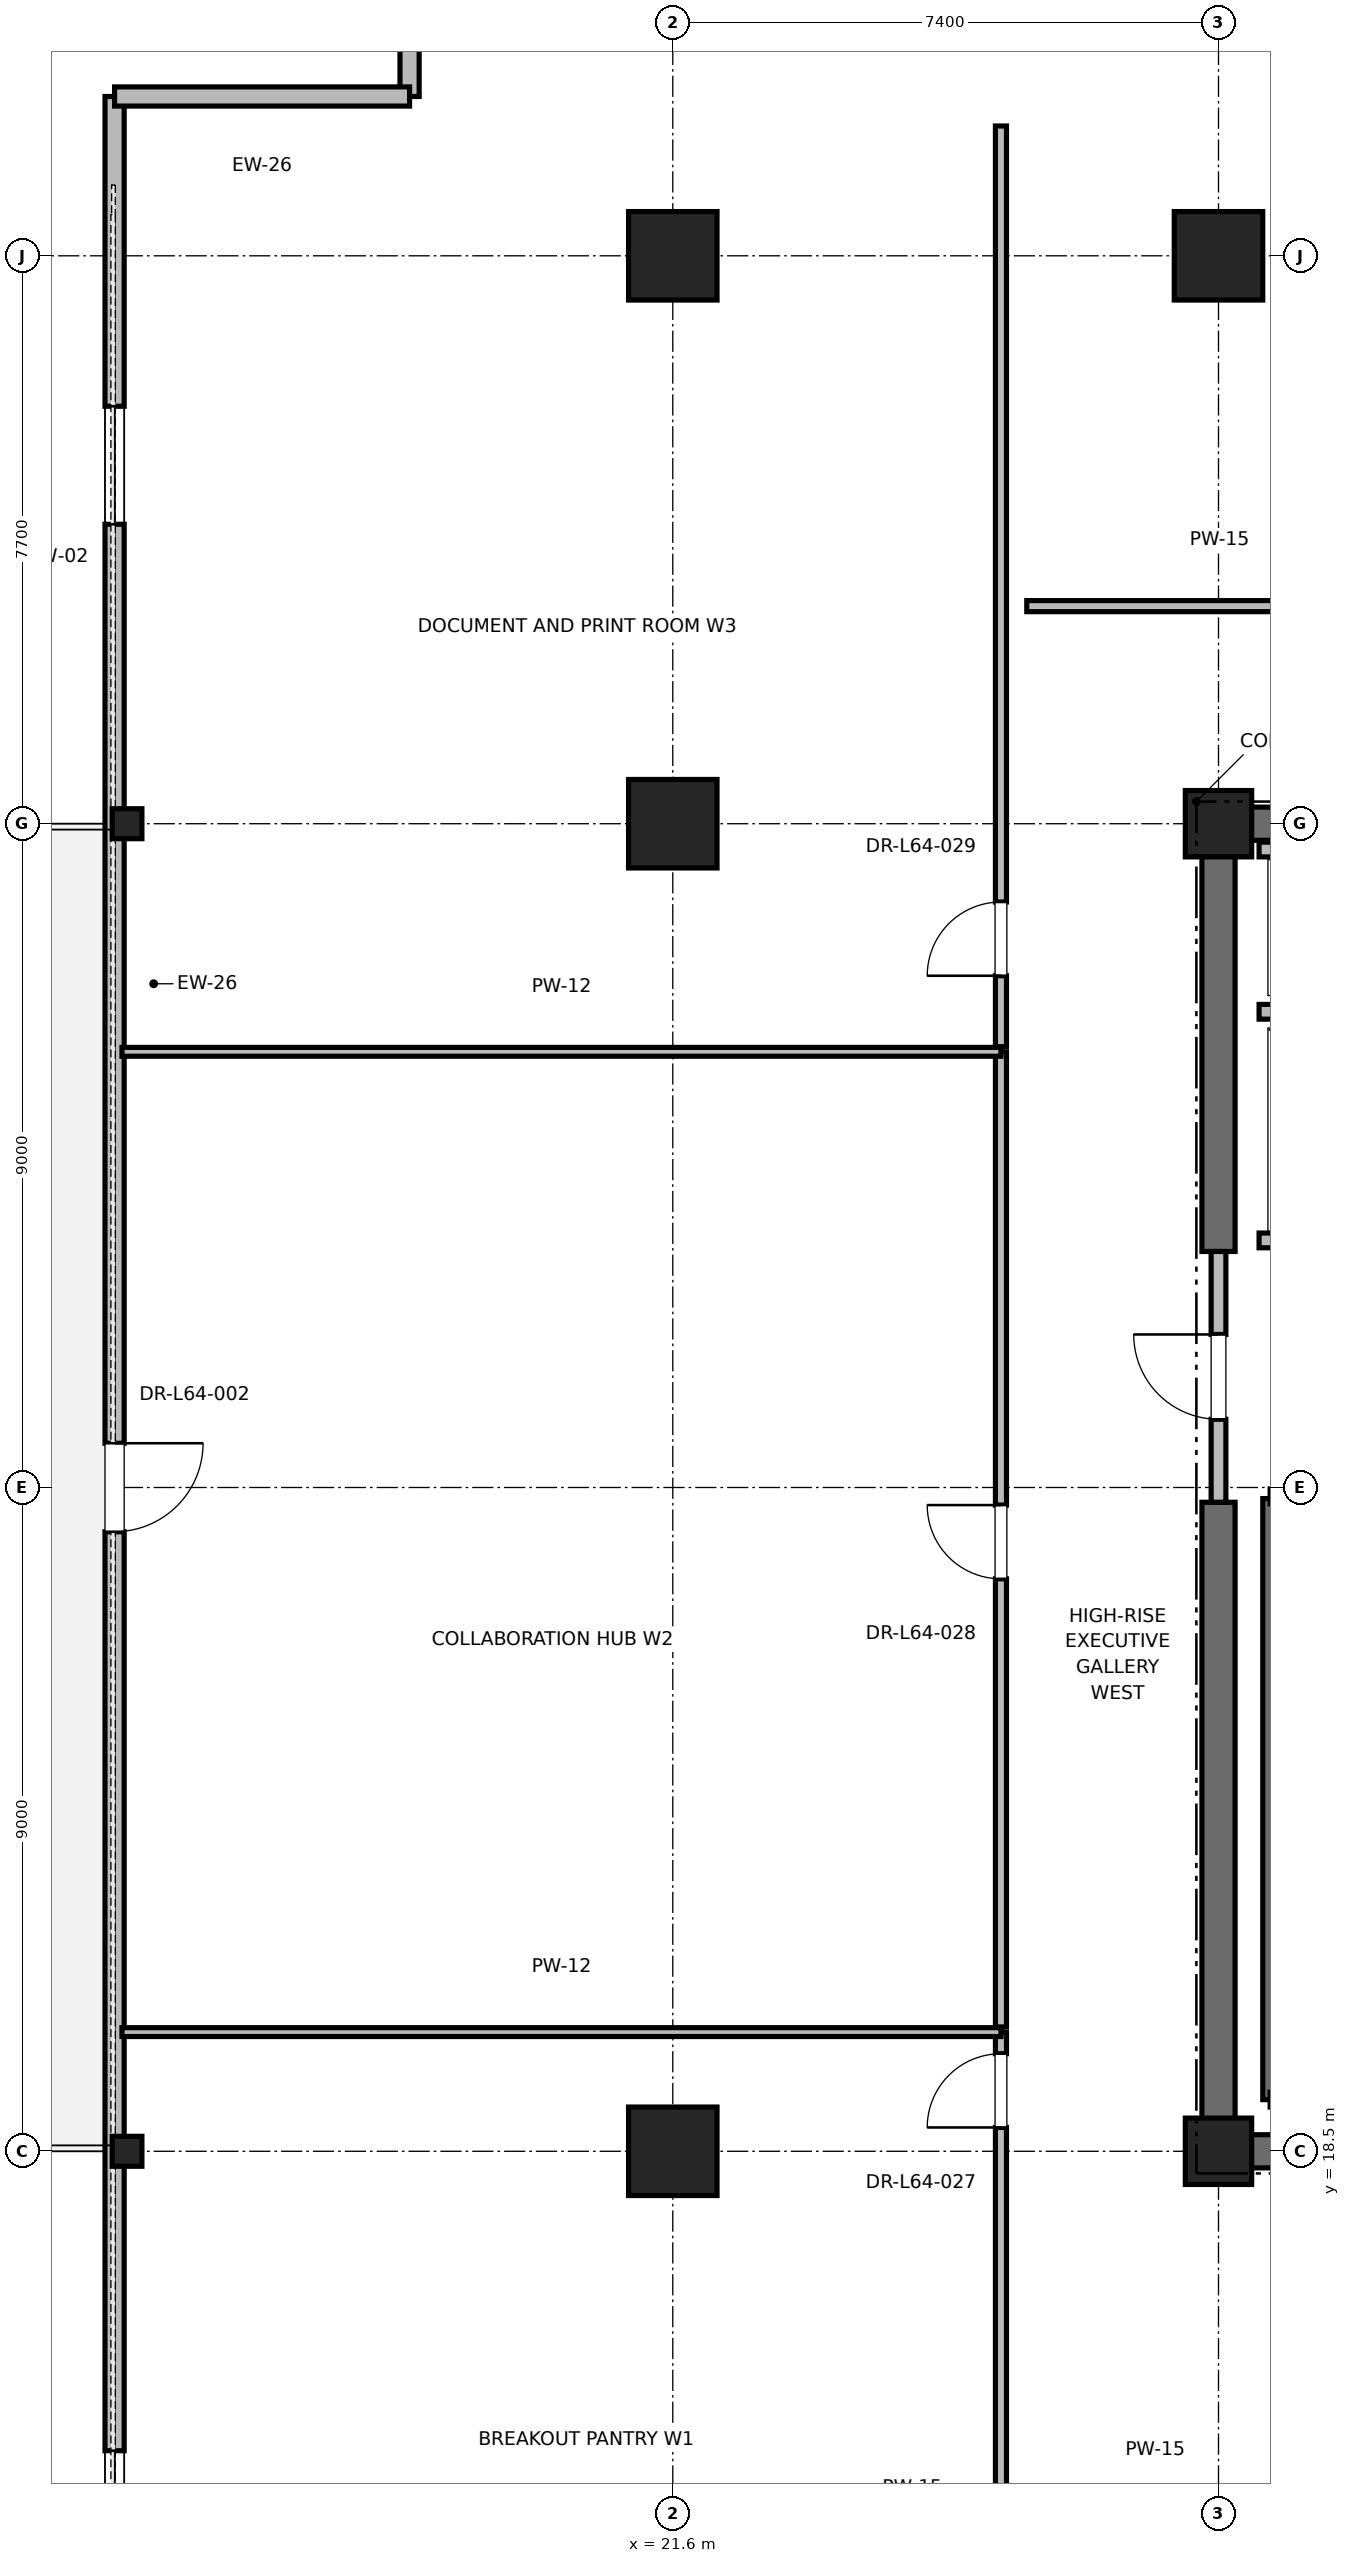
"""IFC4 building model, lengths in metres.
Left out: names, types, materials, properties, quantities, classifications, styles, units other than length and angle.
Written with IfcOpenShell. Run it as: python <this file> out.ifc"""

import sys

from ifc_helpers import new_model, si_unit, direction, frame, frame_2d, origin, origin_2d, place, context, subcontext, project, spatial, rectangle, i_section, extrude, element, fill, save


model = new_model("IFC4")
c1 = context("Model", 3, precision=1e-05, world=origin(), true_north=direction((0.0, 1.0)))
c2 = subcontext(c1, "Body", "Model", "MODEL_VIEW")
j1 = project(units=[si_unit("LENGTHUNIT", "METRE"), si_unit("PLANEANGLEUNIT", "RADIAN")], contexts=[c1])
p1 = place(None, origin())
s1 = spatial("IfcSite", under=j1, at=p1, CompositionType="ELEMENT")
p2 = place(p1, origin())
s2 = spatial("IfcBuilding", under=s1, at=p2, CompositionType="ELEMENT")
p3 = place(p2, frame((0.0, 0.0, 275.2)))
s3 = spatial("IfcBuildingStorey", under=s2, at=p3, CompositionType="ELEMENT", Elevation=275.2)
for number, where, z_axis, x_axis in (
    (1, (29.0, 44.2, 0.0), (0.0, 0.0, 1.0), (1.0, 0.0, 0.0)),
    (2, (21.6, 18.5, 0.0), (0.0, 0.0, 1.0), (1.0, 0.0, 0.0)),
    (3, (21.6, 36.5, 0.0), (0.0, 0.0, 1.0), (1.0, 0.0, 0.0)),
    (4, (21.6, 44.2, 0.0), (0.0, 0.0, 1.0), (1.0, 0.0, 0.0)),
):
    element("IfcColumn", number, at=place(p3, frame(where, z_axis=z_axis, x_axis=x_axis)), inside=s3, PredefinedType="COLUMN", context=c2, shape_type="SweptSolid", body=[
        extrude(rectangle(XDim=1.2, YDim=1.2, at=origin_2d()), origin(), (0.0, 0.0, 1.0), 4.0),
    ])
for number, where, z_axis, x_axis in (
    (5, (14.2, 18.5, 0.0), (0.0, 0.0, 1.0), (1.0, 0.0, 0.0)),
    (6, (14.2, 36.5, 0.0), (0.0, 0.0, 1.0), (1.0, 0.0, 0.0)),
):
    element("IfcColumn", number, at=place(p3, frame(where, z_axis=z_axis, x_axis=x_axis)), inside=s3, PredefinedType="COLUMN", context=c2, shape_type="SweptSolid", body=[
        extrude(i_section(OverallWidth=0.403, OverallDepth=0.406, WebThickness=0.027, FlangeThickness=0.043, FilletRadius=0.015, at=origin_2d()), origin(), (0.0, 0.0, 1.0), 4.0),
    ])
for number, where, z_axis, x_axis in (
    (7, (29.0, 18.5, 0.0), (0.0, 0.0, 1.0), (1.0, 0.0, 0.0)),
    (8, (29.0, 36.5, 0.0), (0.0, 0.0, 1.0), (1.0, 0.0, 0.0)),
):
    element("IfcColumn", number, at=place(p3, frame(where, z_axis=z_axis, x_axis=x_axis)), inside=s3, PredefinedType="PILASTER", context=c2, shape_type="SweptSolid", body=[
        extrude(rectangle(XDim=0.9, YDim=0.9, at=origin_2d()), origin(), (0.0, 0.0, 1.0), 4.0),
    ])
p4 = place(p3, frame((29.0, 18.5, 0.0), z_axis=(0.0, 0.0, 1.0), x_axis=(1.0, 0.0, 0.0)))
e9 = element("IfcWall", 9, at=p4, inside=s3, PredefinedType="SHEAR", context=c2, shape_type="SweptSolid", body=[
    extrude(rectangle(XDim=9.2, YDim=0.45, at=frame_2d((4.6, 0.0))), origin(), (0.0, 0.0, 1.0), 3.785),
])
p5 = place(p3, frame((29.0, 36.5, 0.0), z_axis=(0.0, 0.0, 1.0), x_axis=(1.0, 0.0, 0.0)))
e10 = element("IfcWall", 10, at=p5, inside=s3, PredefinedType="SHEAR", context=c2, shape_type="SweptSolid", body=[
    extrude(rectangle(XDim=5.8, YDim=0.45, at=frame_2d((2.9, 0.0))), origin(), (0.0, 0.0, 1.0), 3.785),
])
p6 = place(p3, frame((29.0, 18.5, 0.0), z_axis=(0.0, 0.0, 1.0), x_axis=(0.0, 1.0, 0.0)))
e11 = element("IfcWall", 11, at=p6, inside=s3, PredefinedType="SHEAR", context=c2, shape_type="SweptSolid", body=[
    extrude(rectangle(XDim=8.8, YDim=0.45, at=frame_2d((4.4, 0.0))), origin(), (0.0, 0.0, 1.0), 3.785),
])
p7 = place(p3, frame((29.0, 30.7, 0.0), z_axis=(0.0, 0.0, 1.0), x_axis=(0.0, 1.0, 0.0)))
e12 = element("IfcWall", 12, at=p7, inside=s3, PredefinedType="SHEAR", context=c2, shape_type="SweptSolid", body=[
    extrude(rectangle(XDim=5.8, YDim=0.45, at=frame_2d((2.9, 0.0))), origin(), (0.0, 0.0, 1.0), 3.785),
])
p8 = place(p3, frame((14.031, 46.36, 0.0), z_axis=(0.0, 0.0, 1.0), x_axis=(0.0, -1.0, 0.0)))
e13 = element("IfcWall", 13, at=p8, inside=s3, PredefinedType="PARAPET", context=c2, shape_type="SweptSolid", body=[
    extrude(rectangle(XDim=37.72, YDim=0.26, at=frame_2d((18.86, 0.0))), origin(), (0.0, 0.0, 1.0), 3.123),
])
p9 = place(p8, frame((4.2, 0.0, 0.85)))
e14 = element("IfcOpeningElement", 14, at=p9, cuts=e13, PredefinedType="OPENING", context=c2, shape_type="SweptSolid", body=[
    extrude(rectangle(XDim=1.6, YDim=2.1, at=frame_2d((0.8, 1.05))), frame((0.0, 0.13, 0.0), z_axis=(0.0, -1.0, 0.0), x_axis=(1.0, 0.0, 0.0)), (0.0, 0.0, 1.0), 0.26),
])
p10 = place(p8, frame((18.26, 0.0, 0.0)))
e15 = element("IfcOpeningElement", 15, at=p10, cuts=e13, PredefinedType="OPENING", context=c2, shape_type="SweptSolid", body=[
    extrude(rectangle(XDim=1.2, YDim=2.2, at=frame_2d((0.6, 1.1))), frame((0.0, 0.13, 0.0), z_axis=(0.0, -1.0, 0.0), x_axis=(1.0, 0.0, 0.0)), (0.0, 0.0, 1.0), 0.26),
])
p11 = place(p8, frame((31.92, 0.0, 0.85)))
e16 = element("IfcOpeningElement", 16, at=p11, cuts=e13, PredefinedType="OPENING", context=c2, shape_type="SweptSolid", body=[
    extrude(rectangle(XDim=1.6, YDim=2.1, at=frame_2d((0.8, 1.05))), frame((0.0, 0.13, 0.0), z_axis=(0.0, -1.0, 0.0), x_axis=(1.0, 0.0, 0.0)), (0.0, 0.0, 1.0), 0.26),
])
p12 = place(p3, frame((18.031, 49.86, 0.0), z_axis=(0.0, 0.0, 1.0), x_axis=(0.0, -1.0, 0.0)))
e17 = element("IfcWall", 17, at=p12, inside=s3, PredefinedType="PARAPET", context=c2, shape_type="SweptSolid", body=[
    extrude(rectangle(XDim=3.5, YDim=0.26, at=frame_2d((1.75, 0.0))), origin(), (0.0, 0.0, 1.0), 3.785),
])
p13 = place(p12, frame((0.85, 0.0, 0.85)))
e18 = element("IfcOpeningElement", 18, at=p13, cuts=e17, PredefinedType="OPENING", context=c2, shape_type="SweptSolid", body=[
    extrude(rectangle(XDim=1.8, YDim=2.2, at=frame_2d((0.9, 1.1))), frame((0.0, 0.13, 0.0), z_axis=(0.0, -1.0, 0.0), x_axis=(1.0, 0.0, 0.0)), (0.0, 0.0, 1.0), 0.26),
])
p14 = place(p3, frame((18.031, 46.36, 0.0), z_axis=(0.0, 0.0, 1.0), x_axis=(-1.0, 0.0, 0.0)))
e19 = element("IfcWall", 19, at=p14, inside=s3, PredefinedType="PARAPET", context=c2, shape_type="SweptSolid", body=[
    extrude(rectangle(XDim=4.0, YDim=0.26, at=frame_2d((2.0, 0.0))), origin(), (0.0, 0.0, 1.0), 3.785),
])
p15 = place(p3, frame((29.7, 19.2, 0.0), z_axis=(0.0, 0.0, 1.0), x_axis=(0.0, 1.0, 0.0)))
e20 = element("IfcWall", 20, at=p15, inside=s3, PredefinedType="SOLIDWALL", context=c2, shape_type="SweptSolid", body=[
    extrude(rectangle(XDim=8.15, YDim=0.2, at=frame_2d((4.075, 0.0))), origin(), (0.0, 0.0, 1.0), 3.785),
])
p16 = place(p3, frame((29.0, 27.3, 0.0), z_axis=(0.0, 0.0, 1.0), x_axis=(0.0, 1.0, 0.0)))
e21 = element("IfcWall", 21, at=p16, inside=s3, PredefinedType="PARTITIONING", context=c2, shape_type="SweptSolid", body=[
    extrude(rectangle(XDim=3.4, YDim=0.2, at=frame_2d((1.7, 0.0))), origin(), (0.0, 0.0, 1.0), 2.865),
])
p17 = place(p16, frame((1.125, 0.0, 0.0)))
e22 = element("IfcOpeningElement", 22, at=p17, cuts=e21, PredefinedType="OPENING", context=c2, shape_type="SweptSolid", body=[
    extrude(rectangle(XDim=1.15, YDim=2.2, at=frame_2d((0.575, 1.1))), frame((0.0, 0.1, 0.0), z_axis=(0.0, -1.0, 0.0), x_axis=(1.0, 0.0, 0.0)), (0.0, 0.0, 1.0), 0.2),
])
p18 = place(p3, frame((29.55, 30.85, 0.0), z_axis=(0.0, 0.0, 1.0), x_axis=(1.0, 0.0, 0.0)))
e23 = element("IfcWall", 23, at=p18, inside=s3, PredefinedType="SOLIDWALL", context=c2, shape_type="SweptSolid", body=[
    extrude(rectangle(XDim=2.6, YDim=0.2, at=frame_2d((1.3, 0.0))), origin(), (0.0, 0.0, 1.0), 2.865),
])
p19 = place(p18, frame((0.75, 0.0, 0.0)))
e24 = element("IfcOpeningElement", 24, at=p19, cuts=e23, PredefinedType="OPENING", context=c2, shape_type="SweptSolid", body=[
    extrude(rectangle(XDim=1.1, YDim=2.2, at=frame_2d((0.55, 1.1))), frame((0.0, 0.1, 0.0), z_axis=(0.0, -1.0, 0.0), x_axis=(1.0, 0.0, 0.0)), (0.0, 0.0, 1.0), 0.2),
])
p20 = place(p3, frame((29.55, 33.95, 0.0), z_axis=(0.0, 0.0, 1.0), x_axis=(1.0, 0.0, 0.0)))
e25 = element("IfcWall", 25, at=p20, inside=s3, PredefinedType="SOLIDWALL", context=c2, shape_type="SweptSolid", body=[
    extrude(rectangle(XDim=2.8, YDim=0.2, at=frame_2d((1.4, 0.0))), origin(), (0.0, 0.0, 1.0), 3.785),
])
p21 = place(p3, frame((32.35, 36.15, 0.0), z_axis=(0.0, 0.0, 1.0), x_axis=(-1.0, 0.0, 0.0)))
e26 = element("IfcWall", 26, at=p21, inside=s3, PredefinedType="SOLIDWALL", context=c2, shape_type="SweptSolid", body=[
    extrude(rectangle(XDim=2.8, YDim=0.2, at=frame_2d((1.4, 0.0))), origin(), (0.0, 0.0, 1.0), 3.148),
])
p22 = place(p3, frame((26.4, 39.45, 0.0), z_axis=(0.0, 0.0, 1.0), x_axis=(1.0, 0.0, 0.0)))
e27 = element("IfcWall", 27, at=p22, inside=s3, PredefinedType="PARTITIONING", context=c2, shape_type="SweptSolid", body=[
    extrude(rectangle(XDim=11.424, YDim=0.15, at=frame_2d((5.712, 0.0))), origin(), (0.0, 0.0, 1.0), 2.85),
])
p23 = place(p22, frame((5.227, 0.0, 0.0)))
e28 = element("IfcOpeningElement", 28, at=p23, cuts=e27, PredefinedType="OPENING", context=c2, shape_type="SweptSolid", body=[
    extrude(rectangle(XDim=1.0, YDim=2.15, at=frame_2d((0.5, 1.075))), frame((0.0, 0.075, 0.0), z_axis=(0.0, -1.0, 0.0), x_axis=(1.0, 0.0, 0.0)), (0.0, 0.0, 1.0), 0.15),
])
p24 = place(p3, frame((26.05, 9.04, 0.0), z_axis=(0.0, 0.0, 1.0), x_axis=(0.0, 1.0, 0.0)))
e29 = element("IfcWall", 29, at=p24, inside=s3, PredefinedType="PARTITIONING", context=c2, shape_type="SweptSolid", body=[
    extrude(rectangle(XDim=11.076, YDim=0.15, at=frame_2d((5.538, 0.0))), origin(), (0.0, 0.0, 1.0), 2.85),
])
p25 = place(p24, frame((9.783, 0.0, 0.0)))
e30 = element("IfcOpeningElement", 30, at=p25, cuts=e29, PredefinedType="OPENING", context=c2, shape_type="SweptSolid", body=[
    extrude(rectangle(XDim=1.0, YDim=2.15, at=frame_2d((0.5, 1.075))), frame((0.0, 0.075, 0.0), z_axis=(0.0, -1.0, 0.0), x_axis=(1.0, 0.0, 0.0)), (0.0, 0.0, 1.0), 0.15),
])
p26 = place(p3, frame((14.131, 20.116, 0.0), z_axis=(0.0, 0.0, 1.0), x_axis=(1.0, 0.0, 0.0)))
e31 = element("IfcWall", 31, at=p26, inside=s3, PredefinedType="PARTITIONING", context=c2, shape_type="SweptSolid", body=[
    extrude(rectangle(XDim=11.919, YDim=0.12, at=frame_2d((5.96, 0.0))), origin(), (0.0, 0.0, 1.0), 2.85),
])
p27 = place(p3, frame((26.05, 20.186, 0.0), z_axis=(0.0, 0.0, 1.0), x_axis=(0.0, 1.0, 0.0)))
e32 = element("IfcWall", 32, at=p27, inside=s3, PredefinedType="PARTITIONING", context=c2, shape_type="SweptSolid", body=[
    extrude(rectangle(XDim=13.221, YDim=0.15, at=frame_2d((6.611, 0.0))), origin(), (0.0, 0.0, 1.0), 2.85),
])
p28 = place(p27, frame((6.076, 0.0, 0.0)))
e33 = element("IfcOpeningElement", 33, at=p28, cuts=e32, PredefinedType="OPENING", context=c2, shape_type="SweptSolid", body=[
    extrude(rectangle(XDim=1.0, YDim=2.15, at=frame_2d((0.5, 1.075))), frame((0.0, 0.075, 0.0), z_axis=(0.0, -1.0, 0.0), x_axis=(1.0, 0.0, 0.0)), (0.0, 0.0, 1.0), 0.15),
])
p29 = place(p3, frame((14.131, 33.407, 0.0), z_axis=(0.0, 0.0, 1.0), x_axis=(1.0, 0.0, 0.0)))
e34 = element("IfcWall", 34, at=p29, inside=s3, PredefinedType="PARTITIONING", context=c2, shape_type="SweptSolid", body=[
    extrude(rectangle(XDim=11.919, YDim=0.12, at=frame_2d((5.96, 0.0))), origin(), (0.0, 0.0, 1.0), 2.85),
])
p30 = place(p3, frame((26.05, 33.477, 0.0), z_axis=(0.0, 0.0, 1.0), x_axis=(0.0, 1.0, 0.0)))
e35 = element("IfcWall", 35, at=p30, inside=s3, PredefinedType="PARTITIONING", context=c2, shape_type="SweptSolid", body=[
    extrude(rectangle(XDim=12.483, YDim=0.15, at=frame_2d((6.241, 0.0))), origin(), (0.0, 0.0, 1.0), 2.85),
])
p31 = place(p30, frame((0.961, 0.0, 0.0)))
e36 = element("IfcOpeningElement", 36, at=p31, cuts=e35, PredefinedType="OPENING", context=c2, shape_type="SweptSolid", body=[
    extrude(rectangle(XDim=1.0, YDim=2.15, at=frame_2d((0.5, 1.075))), frame((0.0, 0.075, 0.0), z_axis=(0.0, -1.0, 0.0), x_axis=(1.0, 0.0, 0.0)), (0.0, 0.0, 1.0), 0.15),
])
p32 = place(p9, origin())
e37 = element("IfcWindow", 37, at=p32, inside=s3, PartitioningType="SINGLE_PANEL", PredefinedType="WINDOW", context=c2, shape_type="SweptSolid", body=[
    extrude(rectangle(XDim=1.6, YDim=2.1, at=frame_2d((0.8, 1.05))), frame((0.0, 0.03, 0.0), z_axis=(0.0, -1.0, 0.0), x_axis=(1.0, 0.0, 0.0)), (0.0, 0.0, 1.0), 0.06),
])
fill(e14, e37)
p33 = place(p10, origin())
e38 = element("IfcDoor", 38, at=p33, inside=s3, OperationType="SINGLE_SWING_LEFT", PredefinedType="DOOR", context=c2, shape_type="SweptSolid", body=[
    extrude(rectangle(XDim=1.2, YDim=2.2, at=frame_2d((0.6, 1.1))), frame((0.0, 0.025, 0.0), z_axis=(0.0, -1.0, 0.0), x_axis=(1.0, 0.0, 0.0)), (0.0, 0.0, 1.0), 0.05),
])
fill(e15, e38)
p34 = place(p11, origin())
e39 = element("IfcWindow", 39, at=p34, inside=s3, PartitioningType="SINGLE_PANEL", PredefinedType="WINDOW", context=c2, shape_type="SweptSolid", body=[
    extrude(rectangle(XDim=1.6, YDim=2.1, at=frame_2d((0.8, 1.05))), frame((0.0, 0.03, 0.0), z_axis=(0.0, -1.0, 0.0), x_axis=(1.0, 0.0, 0.0)), (0.0, 0.0, 1.0), 0.06),
])
fill(e16, e39)
p35 = place(p17, origin())
e40 = element("IfcDoor", 40, at=p35, inside=s3, OperationType="SINGLE_SWING_RIGHT", PredefinedType="DOOR", context=c2, shape_type="SweptSolid", body=[
    extrude(rectangle(XDim=1.15, YDim=2.2, at=frame_2d((0.575, 1.1))), frame((0.0, 0.025, 0.0), z_axis=(0.0, -1.0, 0.0), x_axis=(1.0, 0.0, 0.0)), (0.0, 0.0, 1.0), 0.05),
])
fill(e22, e40)
p36 = place(p25, origin())
e41 = element("IfcDoor", 41, at=p36, inside=s3, OperationType="SINGLE_SWING_LEFT", PredefinedType="DOOR", context=c2, shape_type="SweptSolid", body=[
    extrude(rectangle(XDim=1.0, YDim=2.15, at=frame_2d((0.5, 1.075))), frame((0.0, 0.025, 0.0), z_axis=(0.0, -1.0, 0.0), x_axis=(1.0, 0.0, 0.0)), (0.0, 0.0, 1.0), 0.05),
])
fill(e30, e41)
p37 = place(p28, origin())
e42 = element("IfcDoor", 42, at=p37, inside=s3, OperationType="SINGLE_SWING_RIGHT", PredefinedType="DOOR", context=c2, shape_type="SweptSolid", body=[
    extrude(rectangle(XDim=1.0, YDim=2.15, at=frame_2d((0.5, 1.075))), frame((0.0, 0.025, 0.0), z_axis=(0.0, -1.0, 0.0), x_axis=(1.0, 0.0, 0.0)), (0.0, 0.0, 1.0), 0.05),
])
fill(e33, e42)
p38 = place(p31, origin())
e43 = element("IfcDoor", 43, at=p38, inside=s3, OperationType="SINGLE_SWING_LEFT", PredefinedType="DOOR", context=c2, shape_type="SweptSolid", body=[
    extrude(rectangle(XDim=1.0, YDim=2.15, at=frame_2d((0.5, 1.075))), frame((0.0, 0.025, 0.0), z_axis=(0.0, -1.0, 0.0), x_axis=(1.0, 0.0, 0.0)), (0.0, 0.0, 1.0), 0.05),
])
fill(e36, e43)
save(model, sys.argv[1])
